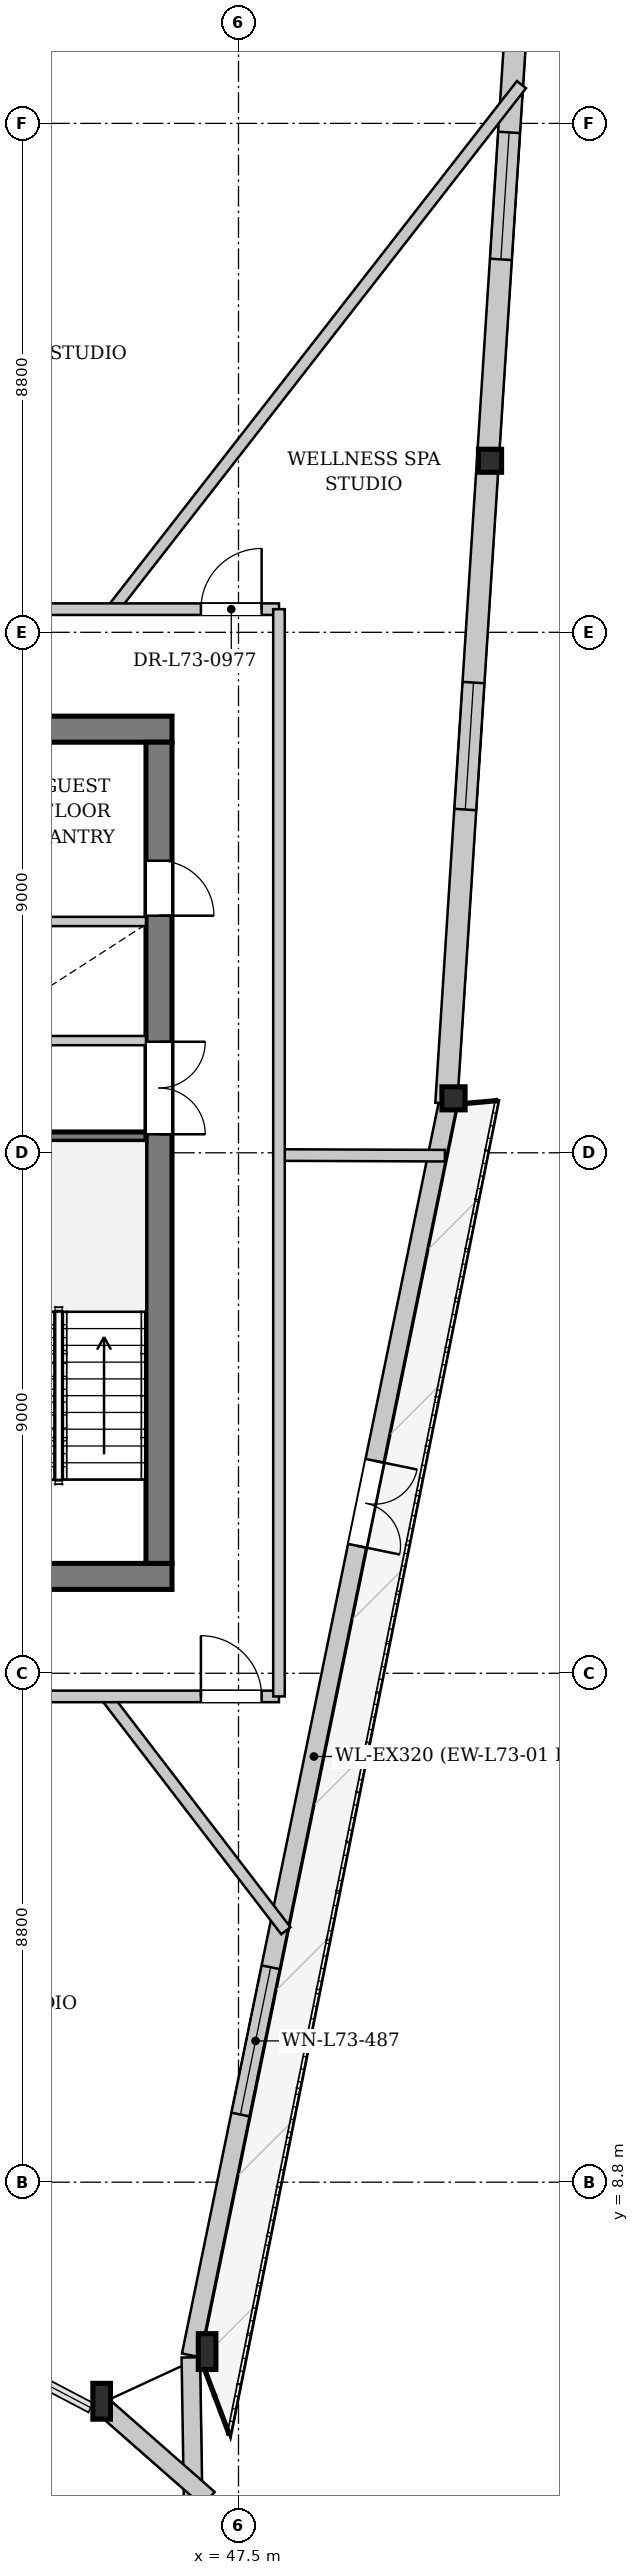
"""IFC4 building model, lengths in metres.
Left out: names, types, materials, properties, quantities, classifications, styles, units other than length and angle.
Written with IfcOpenShell. Run it as: python <this file> out.ifc"""

import sys

from ifc_helpers import new_model, si_unit, direction, frame, frame_2d, origin, origin_2d, place, context, subcontext, project, spatial, rectangle, i_section, extrude, source, transform, mapped, element, fill, save


model = new_model("IFC4")
c1 = context("Model", 3, precision=1e-05, world=origin(), true_north=direction((0.0, 1.0)))
c2 = subcontext(c1, "Body", "Model", "MODEL_VIEW")
j1 = project(units=[si_unit("LENGTHUNIT", "METRE"), si_unit("PLANEANGLEUNIT", "RADIAN")], contexts=[c1])
p1 = place(None, origin())
s1 = spatial("IfcSite", under=j1, at=p1, CompositionType="ELEMENT")
p2 = place(p1, origin())
s2 = spatial("IfcBuilding", under=s1, at=p2, CompositionType="ELEMENT")
p3 = place(p2, frame((0.0, 0.0, 274.1)))
s3 = spatial("IfcBuildingStorey", under=s2, at=p3, CompositionType="ELEMENT", Elevation=274.1)
m1 = source(origin(), c2, "Body", "SweptSolid", [
    extrude(i_section(OverallWidth=0.305, OverallDepth=0.62, WebThickness=0.021, FlangeThickness=0.04, at=origin_2d()), origin(), (0.0, 0.0, 1.0), 3.462),
])
p4 = place(p3, frame((44.946, 4.9, 0.0), z_axis=(0.108166795995, 0.064378282101, 0.992046057922), x_axis=(-0.511444466069, 0.859316331817, 0.0)))
e1 = element("IfcColumn", 1, at=p4, inside=s3, PredefinedType="COLUMN", context=c2, shape_type="MappedRepresentation", body=[
    mapped(m1, transform((0.0, 0.0, 0.0), x_axis=(1.0, 0.0, 0.0), y_axis=(0.0, 1.0, 0.0), z_axis=(0.0, 0.0, 1.0), scale=1.0)),
])
m2 = source(origin(), c2, "Body", "SweptSolid", [
    extrude(i_section(OverallWidth=0.305, OverallDepth=0.62, WebThickness=0.021, FlangeThickness=0.04, at=origin_2d()), origin(), (0.0, 0.0, 1.0), 3.449),
])
p5 = place(p3, frame((46.836, 5.773, 0.0), z_axis=(0.070221852899, 0.05670131469, 0.99591859722), x_axis=(-0.628227565106, 0.778029643677, 0.0)))
e2 = element("IfcColumn", 2, at=p5, inside=s3, PredefinedType="COLUMN", context=c2, shape_type="MappedRepresentation", body=[
    mapped(m2, transform((0.0, 0.0, 0.0), x_axis=(1.0, 0.0, 0.0), y_axis=(0.0, 1.0, 0.0), z_axis=(0.0, 0.0, 1.0), scale=1.0)),
])
m3 = source(origin(), c2, "Body", "SweptSolid", [
    extrude(i_section(OverallWidth=0.401, OverallDepth=0.399, WebThickness=0.022, FlangeThickness=0.034, at=origin_2d()), origin(), (0.0, 0.0, 1.0), 3.443),
])
p6 = place(p3, frame((51.282, 27.441, 0.0), z_axis=(-0.037367888367, 0.058498117463, 0.997587896464), x_axis=(-0.84273487862, -0.538328825494, 0.0)))
e3 = element("IfcColumn", 3, at=p6, inside=s3, PredefinedType="COLUMN", context=c2, shape_type="MappedRepresentation", body=[
    mapped(m3, transform((0.0, 0.0, 0.0), x_axis=(1.0, 0.0, 0.0), y_axis=(0.0, 1.0, 0.0), z_axis=(0.0, 0.0, 1.0), scale=1.0)),
])
m4 = source(origin(), c2, "Body", "SweptSolid", [
    extrude(i_section(OverallWidth=0.401, OverallDepth=0.399, WebThickness=0.022, FlangeThickness=0.034, at=origin_2d()), origin(), (0.0, 0.0, 1.0), 3.452),
])
p7 = place(p3, frame((51.997, 38.477, 0.0), z_axis=(-0.085433681013, 0.051627969487, 0.995005346174), x_axis=(-0.517202143643, -0.855863273316, 0.0)))
e4 = element("IfcColumn", 4, at=p7, inside=s3, PredefinedType="COLUMN", context=c2, shape_type="MappedRepresentation", body=[
    mapped(m4, transform((0.0, 0.0, 0.0), x_axis=(1.0, 0.0, 0.0), y_axis=(0.0, 1.0, 0.0), z_axis=(0.0, 0.0, 1.0), scale=1.0)),
])
p8 = place(p3, frame((51.126, 27.473, 0.0), z_axis=(0.0, 0.0, 1.0), x_axis=(-0.201040285464, -0.979582974342, 0.0)))
e5 = element("IfcWall", 5, at=p8, inside=s3, PredefinedType="SOLIDWALL", context=c2, shape_type="SweptSolid", body=[
    extrude(rectangle(XDim=22.119, YDim=0.32, at=frame_2d((11.06, 0.0))), origin(), (0.0, 0.0, 1.0), 2.812),
])
p9 = place(p8, frame((6.328, 0.0, 0.0)))
e6 = element("IfcOpeningElement", 6, at=p9, cuts=e5, PredefinedType="OPENING", context=c2, shape_type="SweptSolid", body=[
    extrude(rectangle(XDim=1.5, YDim=2.3, at=frame_2d((0.75, 1.15))), frame((0.0, 0.17, 0.0), z_axis=(0.0, -1.0, 0.0), x_axis=(1.0, 0.0, 0.0)), (0.0, 0.0, 1.0), 0.34),
])
p10 = place(p8, frame((15.268, 0.0, 0.342)))
e7 = element("IfcOpeningElement", 7, at=p10, cuts=e5, PredefinedType="OPENING", context=c2, shape_type="SweptSolid", body=[
    extrude(rectangle(XDim=2.6, YDim=2.35, at=frame_2d((1.3, 1.175))), frame((0.0, 0.17, 0.0), z_axis=(0.0, -1.0, 0.0), x_axis=(1.0, 0.0, 0.0)), (0.0, 0.0, 1.0), 0.34),
])
for number, where, z_axis, x_axis in (
    (8, (46.676, 5.771, 0.0), (0.0, 0.0, 1.0), (0.016, -1.0, 0.0)),
    (9, (46.982, 3.324, 0.0), (0.0, 0.0, 1.0), (-0.751, 0.66, 0.0)),
):
    element("IfcWall", number, at=place(p3, frame(where, z_axis=z_axis, x_axis=x_axis)), inside=s3, PredefinedType="SOLIDWALL", context=c2, shape_type="SweptSolid", body=[
        extrude(rectangle(XDim=2.57, YDim=0.32, at=frame_2d((1.285, 0.0))), origin(), (0.0, 0.0, 1.0), 2.812),
    ])
p11 = place(p3, frame((32.921, 39.085, 0.0), z_axis=(0.0, 0.0, 1.0), x_axis=(0.8579501269, 0.513732984879, 0.0)))
e10 = element("IfcWall", 10, at=p11, inside=s3, PredefinedType="SOLIDWALL", context=c2, shape_type="SweptSolid", body=[
    extrude(rectangle(XDim=21.611, YDim=0.32, at=frame_2d((10.805, 0.0))), origin(), (0.0, 0.0, 1.0), 2.812),
])
p12 = place(p11, frame((6.165, 0.0, 0.0)))
e11 = element("IfcOpeningElement", 11, at=p12, cuts=e10, PredefinedType="OPENING", context=c2, shape_type="SweptSolid", body=[
    extrude(rectangle(XDim=1.5, YDim=2.3, at=frame_2d((0.75, 1.15))), frame((0.0, 0.17, 0.0), z_axis=(0.0, -1.0, 0.0), x_axis=(1.0, 0.0, 0.0)), (0.0, 0.0, 1.0), 0.34),
])
p13 = place(p11, frame((14.692, 0.0, 0.342)))
e12 = element("IfcOpeningElement", 12, at=p13, cuts=e10, PredefinedType="OPENING", context=c2, shape_type="SweptSolid", body=[
    extrude(rectangle(XDim=2.6, YDim=2.35, at=frame_2d((1.3, 1.175))), frame((0.0, 0.17, 0.0), z_axis=(0.0, -1.0, 0.0), x_axis=(1.0, 0.0, 0.0)), (0.0, 0.0, 1.0), 0.34),
])
p14 = place(p3, frame((52.521, 49.526, 0.0), z_axis=(0.0, 0.0, 1.0), x_axis=(-0.064581194321, -0.99791245575, 0.0)))
e13 = element("IfcWall", 13, at=p14, inside=s3, PredefinedType="SOLIDWALL", context=c2, shape_type="SweptSolid", body=[
    extrude(rectangle(XDim=22.119, YDim=0.38, at=frame_2d((11.06, 0.0))), origin(), (0.0, 0.0, 1.0), 2.812),
])
p15 = place(p14, frame((5.293, 0.0, 0.442)))
e14 = element("IfcOpeningElement", 14, at=p15, cuts=e13, PredefinedType="OPENING", context=c2, shape_type="SweptSolid", body=[
    extrude(rectangle(XDim=2.2, YDim=2.25, at=frame_2d((1.1, 1.125))), frame((0.0, 0.2, 0.0), z_axis=(0.0, -1.0, 0.0), x_axis=(1.0, 0.0, 0.0)), (0.0, 0.0, 1.0), 0.4),
])
p16 = place(p14, frame((14.826, 0.0, 0.442)))
e15 = element("IfcOpeningElement", 15, at=p16, cuts=e13, PredefinedType="OPENING", context=c2, shape_type="SweptSolid", body=[
    extrude(rectangle(XDim=2.2, YDim=2.25, at=frame_2d((1.1, 1.125))), frame((0.0, 0.2, 0.0), z_axis=(0.0, -1.0, 0.0), x_axis=(1.0, 0.0, 0.0)), (0.0, 0.0, 1.0), 0.4),
])
p17 = place(p3, frame((46.35, 19.275, 0.0), z_axis=(0.0, 0.0, 1.0), x_axis=(-1.0, 0.0, 0.0)))
e16 = element("IfcWall", 16, at=p17, inside=s3, PredefinedType="SHEAR", context=c2, shape_type="SweptSolid", body=[
    extrude(rectangle(XDim=16.7, YDim=0.45, at=frame_2d((8.35, 0.0))), origin(), (0.0, 0.0, 1.0), 3.32),
])
p18 = place(p17, frame((4.55, 0.0, 0.0)))
e17 = element("IfcOpeningElement", 17, at=p18, cuts=e16, PredefinedType="OPENING", context=c2, shape_type="SweptSolid", body=[
    extrude(rectangle(XDim=1.12, YDim=2.25, at=frame_2d((0.56, 1.125))), frame((0.0, 0.235, 0.0), z_axis=(0.0, -1.0, 0.0), x_axis=(1.0, 0.0, 0.0)), (0.0, 0.0, 1.0), 0.47),
])
p19 = place(p17, frame((11.05, 0.0, 0.0)))
e18 = element("IfcOpeningElement", 18, at=p19, cuts=e16, PredefinedType="OPENING", context=c2, shape_type="SweptSolid", body=[
    extrude(rectangle(XDim=1.12, YDim=2.25, at=frame_2d((0.56, 1.125))), frame((0.0, 0.235, 0.0), z_axis=(0.0, -1.0, 0.0), x_axis=(1.0, 0.0, 0.0)), (0.0, 0.0, 1.0), 0.47),
])
p20 = place(p3, frame((29.65, 33.925, 0.0), z_axis=(0.0, 0.0, 1.0), x_axis=(1.0, 0.0, 0.0)))
e19 = element("IfcWall", 19, at=p20, inside=s3, PredefinedType="SHEAR", context=c2, shape_type="SweptSolid", body=[
    extrude(rectangle(XDim=16.7, YDim=0.45, at=frame_2d((8.35, 0.0))), origin(), (0.0, 0.0, 1.0), 3.32),
])
p21 = place(p20, frame((1.45, 0.0, 0.0)))
e20 = element("IfcOpeningElement", 20, at=p21, cuts=e19, PredefinedType="OPENING", context=c2, shape_type="SweptSolid", body=[
    extrude(rectangle(XDim=0.95, YDim=2.1, at=frame_2d((0.475, 1.05))), frame((0.0, 0.235, 0.0), z_axis=(0.0, -1.0, 0.0), x_axis=(1.0, 0.0, 0.0)), (0.0, 0.0, 1.0), 0.47),
])
p22 = place(p20, frame((3.83, 0.0, 0.0)))
e21 = element("IfcOpeningElement", 21, at=p22, cuts=e19, PredefinedType="OPENING", context=c2, shape_type="SweptSolid", body=[
    extrude(rectangle(XDim=1.32, YDim=2.2, at=frame_2d((0.66, 1.1))), frame((0.0, 0.235, 0.0), z_axis=(0.0, -1.0, 0.0), x_axis=(1.0, 0.0, 0.0)), (0.0, 0.0, 1.0), 0.47),
])
p23 = place(p3, frame((46.125, 33.7, 0.0), z_axis=(0.0, 0.0, 1.0), x_axis=(0.0, -1.0, 0.0)))
e22 = element("IfcWall", 22, at=p23, inside=s3, PredefinedType="SHEAR", context=c2, shape_type="SweptSolid", body=[
    extrude(rectangle(XDim=14.2, YDim=0.45, at=frame_2d((7.1, 0.0))), origin(), (0.0, 0.0, 1.0), 3.32),
])
p24 = place(p23, frame((5.18, 0.0, 0.0)))
e23 = element("IfcOpeningElement", 23, at=p24, cuts=e22, PredefinedType="OPENING", context=c2, shape_type="SweptSolid", body=[
    extrude(rectangle(XDim=1.6, YDim=2.2, at=frame_2d((0.8, 1.1))), frame((0.0, 0.235, 0.0), z_axis=(0.0, -1.0, 0.0), x_axis=(1.0, 0.0, 0.0)), (0.0, 0.0, 1.0), 0.47),
])
p25 = place(p23, frame((2.05, 0.0, 0.0)))
e24 = element("IfcOpeningElement", 24, at=p25, cuts=e22, PredefinedType="OPENING", context=c2, shape_type="SweptSolid", body=[
    extrude(rectangle(XDim=0.95, YDim=2.1, at=frame_2d((0.475, 1.05))), frame((0.0, 0.235, 0.0), z_axis=(0.0, -1.0, 0.0), x_axis=(1.0, 0.0, 0.0)), (0.0, 0.0, 1.0), 0.47),
])
p26 = place(p3, frame((42.88, 26.88, 0.0), z_axis=(0.0, 0.0, 1.0), x_axis=(1.0, 0.0, 0.0)))
e25 = element("IfcWall", 25, at=p26, inside=s3, PredefinedType="PARTITIONING", context=c2, shape_type="SweptSolid", body=[
    extrude(rectangle(XDim=3.02, YDim=0.16, at=frame_2d((1.51, 0.0))), origin(), (0.0, 0.0, 1.0), 3.32),
])
p27 = place(p3, frame((33.28, 28.54, 0.0), z_axis=(0.0, 0.0, 1.0), x_axis=(1.0, 0.0, 0.0)))
e26 = element("IfcWall", 26, at=p27, inside=s3, PredefinedType="PARTITIONING", context=c2, shape_type="SweptSolid", body=[
    extrude(rectangle(XDim=12.62, YDim=0.16, at=frame_2d((6.31, 0.0))), origin(), (0.0, 0.0, 1.0), 3.32),
])
p28 = place(p27, frame((0.26, 0.0, 0.0)))
e27 = element("IfcOpeningElement", 27, at=p28, cuts=e26, PredefinedType="OPENING", context=c2, shape_type="SweptSolid", body=[
    extrude(rectangle(XDim=1.1, YDim=2.2, at=frame_2d((0.55, 1.1))), frame((0.0, 0.09, 0.0), z_axis=(0.0, -1.0, 0.0), x_axis=(1.0, 0.0, 0.0)), (0.0, 0.0, 1.0), 0.18),
])
p29 = place(p27, frame((2.01, 0.0, 0.0)))
e28 = element("IfcOpeningElement", 28, at=p29, cuts=e26, PredefinedType="OPENING", context=c2, shape_type="SweptSolid", body=[
    extrude(rectangle(XDim=1.1, YDim=2.2, at=frame_2d((0.55, 1.1))), frame((0.0, 0.09, 0.0), z_axis=(0.0, -1.0, 0.0), x_axis=(1.0, 0.0, 0.0)), (0.0, 0.0, 1.0), 0.18),
])
p30 = place(p27, frame((3.76, 0.0, 0.0)))
e29 = element("IfcOpeningElement", 29, at=p30, cuts=e26, PredefinedType="OPENING", context=c2, shape_type="SweptSolid", body=[
    extrude(rectangle(XDim=1.1, YDim=2.2, at=frame_2d((0.55, 1.1))), frame((0.0, 0.09, 0.0), z_axis=(0.0, -1.0, 0.0), x_axis=(1.0, 0.0, 0.0)), (0.0, 0.0, 1.0), 0.18),
])
p31 = place(p3, frame((40.72, 30.6, 0.0), z_axis=(0.0, 0.0, 1.0), x_axis=(1.0, 0.0, 0.0)))
e30 = element("IfcWall", 30, at=p31, inside=s3, PredefinedType="PARTITIONING", context=c2, shape_type="SweptSolid", body=[
    extrude(rectangle(XDim=5.18, YDim=0.16, at=frame_2d((2.59, 0.0))), origin(), (0.0, 0.0, 1.0), 3.32),
])
p32 = place(p3, frame((45.21, 17.2, 0.0), z_axis=(0.0, 0.0, 1.0), x_axis=(0.608631250034, -0.793453213165, 0.0)))
e31 = element("IfcWall", 31, at=p32, inside=s3, PredefinedType="PARTITIONING", context=c2, shape_type="SweptSolid", body=[
    extrude(rectangle(XDim=5.107, YDim=0.2, at=frame_2d((2.553, 0.0))), origin(), (0.0, 0.0, 1.0), 3.32),
])
p33 = place(p3, frame((48.2, 26.561, 0.0), z_axis=(0.0, 0.0, 1.0), x_axis=(0.999992668941, -0.003829107395, 0.0)))
e32 = element("IfcWall", 32, at=p33, inside=s3, PredefinedType="PARTITIONING", context=c2, shape_type="SweptSolid", body=[
    extrude(rectangle(XDim=2.869, YDim=0.2, at=frame_2d((1.435, 0.0))), origin(), (0.0, 0.0, 1.0), 3.32),
])
p34 = place(p3, frame((45.325, 36.0, 0.0), z_axis=(0.0, 0.0, 1.0), x_axis=(0.614681143214, 0.788775691928, 0.0)))
e33 = element("IfcWall", 33, at=p34, inside=s3, PredefinedType="PARTITIONING", context=c2, shape_type="SweptSolid", body=[
    extrude(rectangle(XDim=11.499, YDim=0.2, at=frame_2d((5.75, 0.0))), origin(), (0.0, 0.0, 1.0), 3.32),
])
p35 = place(p3, frame((27.8, 17.2, 0.0), z_axis=(0.0, 0.0, 1.0), x_axis=(1.0, 0.0, 0.0)))
e34 = element("IfcWall", 34, at=p35, inside=s3, PredefinedType="PARTITIONING", context=c2, shape_type="SweptSolid", body=[
    extrude(rectangle(XDim=20.4, YDim=0.2, at=frame_2d((10.2, 0.0))), origin(), (0.0, 0.0, 1.0), 3.32),
])
p36 = place(p35, frame((14.641, 0.0, 0.0)))
e35 = element("IfcOpeningElement", 35, at=p36, cuts=e34, PredefinedType="OPENING", context=c2, shape_type="SweptSolid", body=[
    extrude(rectangle(XDim=1.05, YDim=2.2, at=frame_2d((0.525, 1.1))), frame((0.0, 0.11, 0.0), z_axis=(0.0, -1.0, 0.0), x_axis=(1.0, 0.0, 0.0)), (0.0, 0.0, 1.0), 0.22),
])
p37 = place(p35, frame((19.05, 0.0, 0.0)))
e36 = element("IfcOpeningElement", 36, at=p37, cuts=e34, PredefinedType="OPENING", context=c2, shape_type="SweptSolid", body=[
    extrude(rectangle(XDim=1.05, YDim=2.2, at=frame_2d((0.525, 1.1))), frame((0.0, 0.11, 0.0), z_axis=(0.0, -1.0, 0.0), x_axis=(1.0, 0.0, 0.0)), (0.0, 0.0, 1.0), 0.22),
])
p38 = place(p35, frame((1.69, 0.0, 0.0)))
e37 = element("IfcOpeningElement", 37, at=p38, cuts=e34, PredefinedType="OPENING", context=c2, shape_type="SweptSolid", body=[
    extrude(rectangle(XDim=1.05, YDim=2.2, at=frame_2d((0.525, 1.1))), frame((0.0, 0.11, 0.0), z_axis=(0.0, -1.0, 0.0), x_axis=(1.0, 0.0, 0.0)), (0.0, 0.0, 1.0), 0.22),
])
p39 = place(p3, frame((43.4, 36.0, 0.0), z_axis=(0.0, 0.0, 1.0), x_axis=(1.0, 0.0, 0.0)))
e38 = element("IfcWall", 38, at=p39, inside=s3, PredefinedType="PARTITIONING", context=c2, shape_type="SweptSolid", body=[
    extrude(rectangle(XDim=4.8, YDim=0.2, at=frame_2d((2.4, 0.0))), origin(), (0.0, 0.0, 1.0), 3.32),
])
p40 = place(p39, frame((3.45, 0.0, 0.0)))
e39 = element("IfcOpeningElement", 39, at=p40, cuts=e38, PredefinedType="OPENING", context=c2, shape_type="SweptSolid", body=[
    extrude(rectangle(XDim=1.05, YDim=2.2, at=frame_2d((0.525, 1.1))), frame((0.0, 0.11, 0.0), z_axis=(0.0, -1.0, 0.0), x_axis=(1.0, 0.0, 0.0)), (0.0, 0.0, 1.0), 0.22),
])
p41 = place(p3, frame((48.2, 17.2, 0.0), z_axis=(0.0, 0.0, 1.0), x_axis=(0.0, 1.0, 0.0)))
e40 = element("IfcWall", 40, at=p41, inside=s3, PredefinedType="PARTITIONING", context=c2, shape_type="SweptSolid", body=[
    extrude(rectangle(XDim=18.8, YDim=0.2, at=frame_2d((9.4, 0.0))), origin(), (0.0, 0.0, 1.0), 2.945),
])
m5 = source(origin(), c2, "Body", "SweptSolid", [
    extrude(rectangle(XDim=1.5, YDim=2.3, at=frame_2d((0.75, 1.15))), frame((0.0, 0.025, 0.0), z_axis=(0.0, -1.0, 0.0), x_axis=(1.0, 0.0, 0.0)), (0.0, 0.0, 1.0), 0.05),
])
p42 = place(p9, origin())
e41 = element("IfcDoor", 41, at=p42, inside=s3, OperationType="DOUBLE_DOOR_SINGLE_SWING", PredefinedType="DOOR", context=c2, shape_type="MappedRepresentation", body=[
    mapped(m5, transform((0.0, 0.0, 0.0), x_axis=(1.0, 0.0, 0.0), y_axis=(0.0, 1.0, 0.0), z_axis=(0.0, 0.0, 1.0), scale=1.0)),
])
fill(e6, e41)
m6 = source(origin(), c2, "Body", "SweptSolid", [
    extrude(rectangle(XDim=2.6, YDim=2.35, at=frame_2d((1.3, 1.175))), frame((0.0, 0.03, 0.0), z_axis=(0.0, -1.0, 0.0), x_axis=(1.0, 0.0, 0.0)), (0.0, 0.0, 1.0), 0.06),
])
p43 = place(p10, origin())
e42 = element("IfcWindow", 42, at=p43, inside=s3, PartitioningType="SINGLE_PANEL", PredefinedType="WINDOW", context=c2, shape_type="MappedRepresentation", body=[
    mapped(m6, transform((0.0, 0.0, 0.0), x_axis=(1.0, 0.0, 0.0), y_axis=(0.0, 1.0, 0.0), z_axis=(0.0, 0.0, 1.0), scale=1.0)),
])
fill(e7, e42)
m7 = source(origin(), c2, "Body", "SweptSolid", [
    extrude(rectangle(XDim=2.2, YDim=2.25, at=frame_2d((1.1, 1.125))), frame((0.0, 0.03, 0.0), z_axis=(0.0, -1.0, 0.0), x_axis=(1.0, 0.0, 0.0)), (0.0, 0.0, 1.0), 0.06),
])
p44 = place(p15, origin())
e43 = element("IfcWindow", 43, at=p44, inside=s3, PartitioningType="SINGLE_PANEL", PredefinedType="WINDOW", context=c2, shape_type="MappedRepresentation", body=[
    mapped(m7, transform((0.0, 0.0, 0.0), x_axis=(1.0, 0.0, 0.0), y_axis=(0.0, 1.0, 0.0), z_axis=(0.0, 0.0, 1.0), scale=1.0)),
])
fill(e14, e43)
p45 = place(p16, origin())
e44 = element("IfcWindow", 44, at=p45, inside=s3, PartitioningType="SINGLE_PANEL", PredefinedType="WINDOW", context=c2, shape_type="MappedRepresentation", body=[
    mapped(m7, transform((0.0, 0.0, 0.0), x_axis=(1.0, 0.0, 0.0), y_axis=(0.0, 1.0, 0.0), z_axis=(0.0, 0.0, 1.0), scale=1.0)),
])
fill(e15, e44)
m8 = source(origin(), c2, "Body", "SweptSolid", [
    extrude(rectangle(XDim=1.6, YDim=2.2, at=frame_2d((0.8, 1.1))), frame((0.0, 0.025, 0.0), z_axis=(0.0, -1.0, 0.0), x_axis=(1.0, 0.0, 0.0)), (0.0, 0.0, 1.0), 0.05),
])
p46 = place(p24, origin())
e45 = element("IfcDoor", 45, at=p46, inside=s3, OperationType="DOUBLE_DOOR_SINGLE_SWING", PredefinedType="DOOR", context=c2, shape_type="MappedRepresentation", body=[
    mapped(m8, transform((0.0, 0.0, 0.0), x_axis=(1.0, 0.0, 0.0), y_axis=(0.0, 1.0, 0.0), z_axis=(0.0, 0.0, 1.0), scale=1.0)),
])
fill(e23, e45)
m9 = source(origin(), c2, "Body", "SweptSolid", [
    extrude(rectangle(XDim=0.95, YDim=2.1, at=frame_2d((0.475, 1.05))), frame((0.0, 0.025, 0.0), z_axis=(0.0, -1.0, 0.0), x_axis=(1.0, 0.0, 0.0)), (0.0, 0.0, 1.0), 0.05),
])
p47 = place(p25, origin())
e46 = element("IfcDoor", 46, at=p47, inside=s3, OperationType="SINGLE_SWING_RIGHT", PredefinedType="DOOR", context=c2, shape_type="MappedRepresentation", body=[
    mapped(m9, transform((0.0, 0.0, 0.0), x_axis=(1.0, 0.0, 0.0), y_axis=(0.0, 1.0, 0.0), z_axis=(0.0, 0.0, 1.0), scale=1.0)),
])
fill(e24, e46)
m10 = source(origin(), c2, "Body", "SweptSolid", [
    extrude(rectangle(XDim=1.05, YDim=2.2, at=frame_2d((0.525, 1.1))), frame((0.0, 0.025, 0.0), z_axis=(0.0, -1.0, 0.0), x_axis=(1.0, 0.0, 0.0)), (0.0, 0.0, 1.0), 0.05),
])
p48 = place(p37, origin())
e47 = element("IfcDoor", 47, at=p48, inside=s3, OperationType="SINGLE_SWING_LEFT", PredefinedType="DOOR", context=c2, shape_type="MappedRepresentation", body=[
    mapped(m10, transform((0.0, 0.0, 0.0), x_axis=(1.0, 0.0, 0.0), y_axis=(0.0, 1.0, 0.0), z_axis=(0.0, 0.0, 1.0), scale=1.0)),
])
fill(e36, e47)
p49 = place(p40, origin())
e48 = element("IfcDoor", 48, at=p49, inside=s3, OperationType="SINGLE_SWING_RIGHT", PredefinedType="DOOR", context=c2, shape_type="MappedRepresentation", body=[
    mapped(m10, transform((0.0, 0.0, 0.0), x_axis=(1.0, 0.0, 0.0), y_axis=(0.0, 1.0, 0.0), z_axis=(0.0, 0.0, 1.0), scale=1.0)),
])
fill(e39, e48)
save(model, sys.argv[1])
